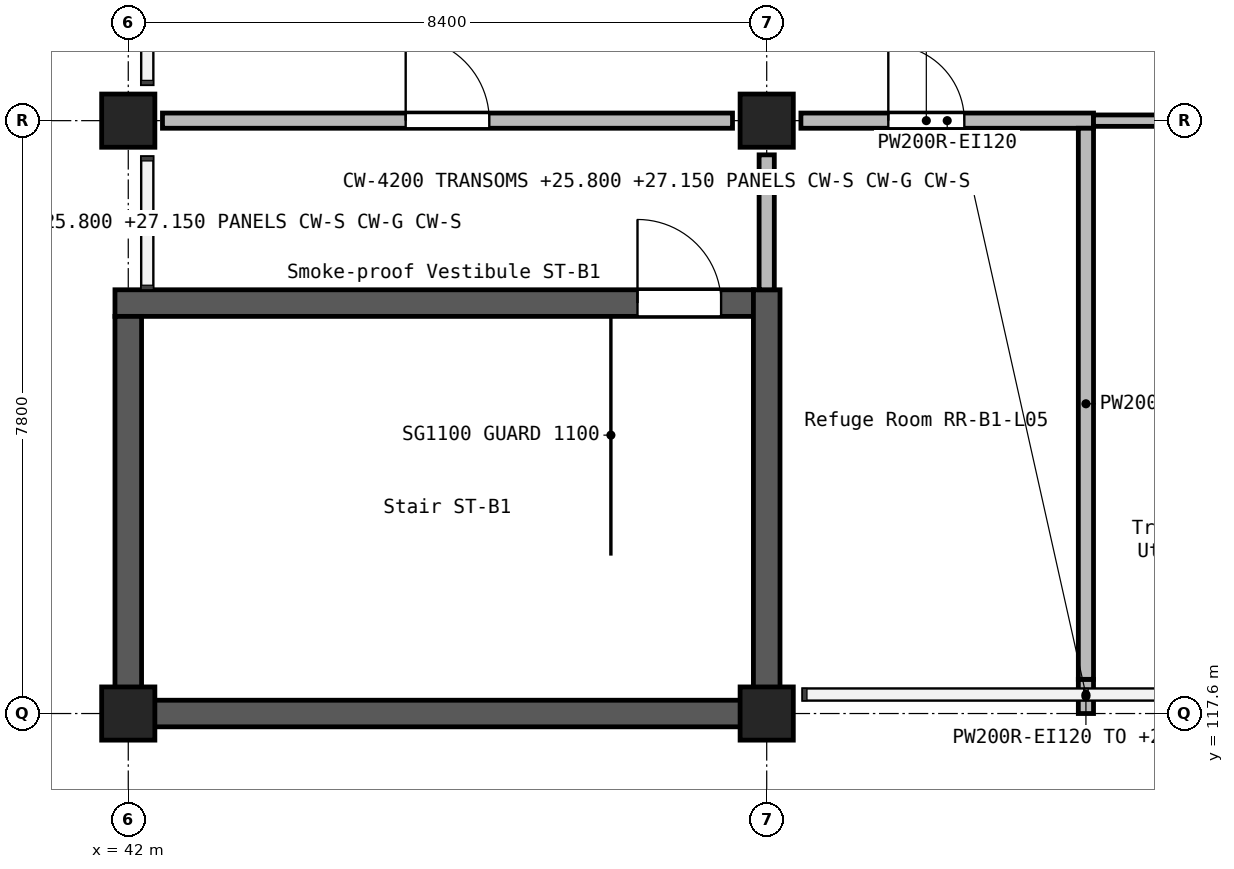
"""IFC4 building model, lengths in metres.
Left out: names, types, materials, properties, quantities, classifications, styles, units other than length and angle.
Written with IfcOpenShell. Run it as: python <this file> out.ifc"""

import sys

from ifc_helpers import new_model, si_unit, direction, frame, frame_2d, origin, origin_2d, place, context, subcontext, project, spatial, rectangle, extrude, element, fill, save


model = new_model("IFC4")
c1 = context("Model", 3, precision=1e-05, world=origin(), true_north=direction((0.0, 1.0)))
c2 = subcontext(c1, "Body", "Model", "MODEL_VIEW")
j1 = project(units=[si_unit("LENGTHUNIT", "METRE"), si_unit("PLANEANGLEUNIT", "RADIAN")], contexts=[c1])
p1 = place(None, origin())
s1 = spatial("IfcSite", under=j1, at=p1, CompositionType="ELEMENT")
p2 = place(p1, origin())
s2 = spatial("IfcBuilding", under=s1, at=p2, CompositionType="ELEMENT")
p3 = place(p2, frame((0.0, 0.0, 24.9)))
s3 = spatial("IfcBuildingStorey", under=s2, at=p3, CompositionType="ELEMENT", Elevation=24.9)
for number, where, z_axis, x_axis in (
    (1, (42.0, 117.6, 0.0), (0.0, 0.0, 1.0), (1.0, 0.0, 0.0)),
    (2, (42.0, 125.4, 0.0), (0.0, 0.0, 1.0), (1.0, 0.0, 0.0)),
    (3, (50.4, 117.6, 0.0), (0.0, 0.0, 1.0), (1.0, 0.0, 0.0)),
    (4, (50.4, 125.4, 0.0), (0.0, 0.0, 1.0), (1.0, 0.0, 0.0)),
):
    element("IfcColumn", number, at=place(p3, frame(where, z_axis=z_axis, x_axis=x_axis)), inside=s3, PredefinedType="COLUMN", context=c2, shape_type="SweptSolid", body=[
        extrude(rectangle(XDim=0.7, YDim=0.7, at=origin_2d()), origin(), (0.0, 0.0, 1.0), 3.9),
    ])
p4 = place(p3, frame((41.825, 123.0, 0.0), z_axis=(0.0, 0.0, 1.0), x_axis=(1.0, 0.0, 0.0)))
e5 = element("IfcWall", 5, at=p4, inside=s3, PredefinedType="SHEAR", context=c2, shape_type="SweptSolid", body=[
    extrude(rectangle(XDim=8.4, YDim=0.35, at=frame_2d((4.2, 0.0))), origin(), (0.0, 0.0, 1.0), 3.9),
])
p5 = place(p4, frame((6.875, 0.0, 0.0)))
e6 = element("IfcOpeningElement", 6, at=p5, cuts=e5, PredefinedType="OPENING", context=c2, shape_type="SweptSolid", body=[
    extrude(rectangle(XDim=1.1, YDim=2.1, at=frame_2d((0.55, 1.05))), frame((0.0, 0.185, 0.0), z_axis=(0.0, -1.0, 0.0), x_axis=(1.0, 0.0, 0.0)), (0.0, 0.0, 1.0), 0.37),
])
p6 = place(p3, frame((42.0, 117.425, 0.0), z_axis=(0.0, 0.0, 1.0), x_axis=(0.0, 1.0, 0.0)))
e7 = element("IfcWall", 7, at=p6, inside=s3, PredefinedType="SHEAR", context=c2, shape_type="SweptSolid", body=[
    extrude(rectangle(XDim=5.4, YDim=0.35, at=frame_2d((2.7, 0.0))), origin(), (0.0, 0.0, 1.0), 3.9),
])
p7 = place(p3, frame((42.175, 117.6, 0.0), z_axis=(0.0, 0.0, 1.0), x_axis=(1.0, 0.0, 0.0)))
e8 = element("IfcWall", 8, at=p7, inside=s3, PredefinedType="SHEAR", context=c2, shape_type="SweptSolid", body=[
    extrude(rectangle(XDim=8.05, YDim=0.35, at=frame_2d((4.025, 0.0))), origin(), (0.0, 0.0, 1.0), 3.9),
])
p8 = place(p3, frame((50.4, 117.425, 0.0), z_axis=(0.0, 0.0, 1.0), x_axis=(0.0, 1.0, 0.0)))
e9 = element("IfcWall", 9, at=p8, inside=s3, PredefinedType="SHEAR", context=c2, shape_type="SweptSolid", body=[
    extrude(rectangle(XDim=5.75, YDim=0.35, at=frame_2d((2.875, 0.0))), origin(), (0.0, 0.0, 1.0), 3.9),
])
p9 = place(p3, frame((42.45, 125.4, 0.0), z_axis=(0.0, 0.0, 1.0), x_axis=(1.0, 0.0, 0.0)))
e10 = element("IfcWall", 10, at=p9, inside=s3, PredefinedType="SOLIDWALL", context=c2, shape_type="SweptSolid", body=[
    extrude(rectangle(XDim=7.5, YDim=0.2, at=frame_2d((3.75, 0.0))), origin(), (0.0, 0.0, 1.0), 3.6),
])
p10 = place(p9, frame((3.2, 0.0, 0.0)))
e11 = element("IfcOpeningElement", 11, at=p10, cuts=e10, PredefinedType="OPENING", context=c2, shape_type="SweptSolid", body=[
    extrude(rectangle(XDim=1.1, YDim=2.1, at=frame_2d((0.55, 1.05))), frame((0.0, 0.11, 0.0), z_axis=(0.0, -1.0, 0.0), x_axis=(1.0, 0.0, 0.0)), (0.0, 0.0, 1.0), 0.22),
])
p11 = place(p3, frame((50.85, 125.4, 0.0), z_axis=(0.0, 0.0, 1.0), x_axis=(1.0, 0.0, 0.0)))
e12 = element("IfcWall", 12, at=p11, inside=s3, PredefinedType="SOLIDWALL", context=c2, shape_type="SweptSolid", body=[
    extrude(rectangle(XDim=3.85, YDim=0.2, at=frame_2d((1.925, 0.0))), origin(), (0.0, 0.0, 1.0), 3.6),
])
p12 = place(p11, frame((1.15, 0.0, 0.0)))
e13 = element("IfcOpeningElement", 13, at=p12, cuts=e12, PredefinedType="OPENING", context=c2, shape_type="SweptSolid", body=[
    extrude(rectangle(XDim=1.0, YDim=2.1, at=frame_2d((0.5, 1.05))), frame((0.0, 0.11, 0.0), z_axis=(0.0, -1.0, 0.0), x_axis=(1.0, 0.0, 0.0)), (0.0, 0.0, 1.0), 0.22),
])
p13 = place(p3, frame((50.4, 123.175, 0.0), z_axis=(0.0, 0.0, 1.0), x_axis=(0.0, 1.0, 0.0)))
e14 = element("IfcWall", 14, at=p13, inside=s3, PredefinedType="SOLIDWALL", context=c2, shape_type="SweptSolid", body=[
    extrude(rectangle(XDim=1.775, YDim=0.2, at=frame_2d((0.887, 0.0))), origin(), (0.0, 0.0, 1.0), 3.6),
])
p14 = place(p3, frame((54.6, 117.6, 0.0), z_axis=(0.0, 0.0, 1.0), x_axis=(0.0, 1.0, 0.0)))
e15 = element("IfcWall", 15, at=p14, inside=s3, PredefinedType="SOLIDWALL", context=c2, shape_type="SweptSolid", body=[
    extrude(rectangle(XDim=0.45, YDim=0.2, at=frame_2d((0.225, 0.0))), origin(), (0.0, 0.0, 1.0), 2.78),
])
p15 = place(p3, frame((54.6, 118.05, 0.0), z_axis=(0.0, 0.0, 1.0), x_axis=(0.0, 1.0, 0.0)))
e16 = element("IfcWall", 16, at=p15, inside=s3, PredefinedType="SOLIDWALL", context=c2, shape_type="SweptSolid", body=[
    extrude(rectangle(XDim=7.25, YDim=0.2, at=frame_2d((3.625, 0.0))), origin(), (0.0, 0.0, 1.0), 3.6),
])
p16 = place(p3, frame((54.7, 125.4, 0.0), z_axis=(0.0, 0.0, 1.0), x_axis=(1.0, 0.0, 0.0)))
e17 = element("IfcWall", 17, at=p16, inside=s3, PredefinedType="PARTITIONING", context=c2, shape_type="SweptSolid", body=[
    extrude(rectangle(XDim=3.65, YDim=0.15, at=frame_2d((1.825, 0.0))), origin(), (0.0, 0.0, 1.0), 3.6),
])
p17 = place(p16, frame((1.5, 0.0, 0.0)))
e18 = element("IfcOpeningElement", 18, at=p17, cuts=e17, PredefinedType="OPENING", context=c2, shape_type="SweptSolid", body=[
    extrude(rectangle(XDim=1.0, YDim=2.1, at=frame_2d((0.5, 1.05))), frame((0.0, 0.085, 0.0), z_axis=(0.0, -1.0, 0.0), x_axis=(1.0, 0.0, 0.0)), (0.0, 0.0, 1.0), 0.17),
])
p18 = place(p12, frame((1.0, 0.0, 0.0), z_axis=(0.0, 0.0, 1.0), x_axis=(-1.0, 0.0, 0.0)))
e19 = element("IfcDoor", 19, at=p18, inside=s3, OperationType="SINGLE_SWING_RIGHT", PredefinedType="DOOR", context=c2, shape_type="SweptSolid", body=[
    extrude(rectangle(XDim=1.0, YDim=2.1, at=frame_2d((0.5, 1.05))), frame((0.0, 0.025, 0.0), z_axis=(0.0, -1.0, 0.0), x_axis=(1.0, 0.0, 0.0)), (0.0, 0.0, 1.0), 0.05),
])
fill(e13, e19)
p19 = place(p5, frame((1.1, 0.0, 0.0), z_axis=(0.0, 0.0, 1.0), x_axis=(-1.0, 0.0, 0.0)))
e20 = element("IfcDoor", 20, at=p19, inside=s3, OperationType="SINGLE_SWING_LEFT", PredefinedType="DOOR", context=c2, shape_type="SweptSolid", body=[
    extrude(rectangle(XDim=1.1, YDim=2.1, at=frame_2d((0.55, 1.05))), frame((0.0, 0.025, 0.0), z_axis=(0.0, -1.0, 0.0), x_axis=(1.0, 0.0, 0.0)), (0.0, 0.0, 1.0), 0.05),
])
fill(e6, e20)
p20 = place(p10, frame((1.1, 0.0, 0.0), z_axis=(0.0, 0.0, 1.0), x_axis=(-1.0, 0.0, 0.0)))
e21 = element("IfcDoor", 21, at=p20, inside=s3, OperationType="SINGLE_SWING_LEFT", PredefinedType="DOOR", context=c2, shape_type="SweptSolid", body=[
    extrude(rectangle(XDim=1.1, YDim=2.1, at=frame_2d((0.55, 1.05))), frame((0.0, 0.025, 0.0), z_axis=(0.0, -1.0, 0.0), x_axis=(1.0, 0.0, 0.0)), (0.0, 0.0, 1.0), 0.05),
])
fill(e11, e21)
save(model, sys.argv[1])
